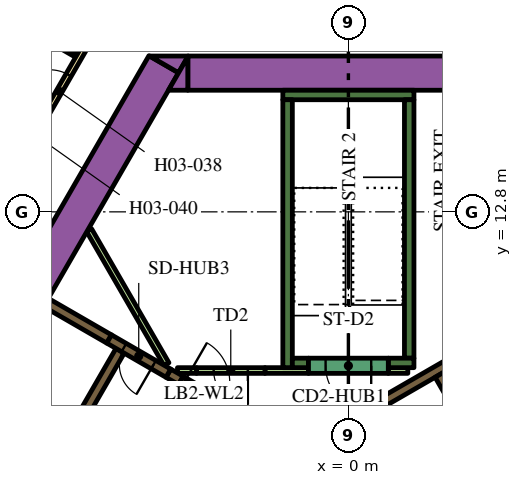
"""IFC4 building model, lengths in metres.
Left out: names, types, materials, properties, quantities, classifications, styles, units other than length and angle.
Written with IfcOpenShell. Run it as: python <this file> out.ifc"""

import sys

from ifc_helpers import new_model, si_unit, direction, frame, frame_2d, origin, place, context, subcontext, project, spatial, polyline, rectangle, outline, extrude, element, fill, save


model = new_model("IFC4")
c1 = context("Model", 3, precision=1e-05, world=origin(), true_north=direction((0.0, 1.0)))
c2 = subcontext(c1, "Body", "Model", "MODEL_VIEW")
j1 = project(units=[si_unit("LENGTHUNIT", "METRE"), si_unit("PLANEANGLEUNIT", "RADIAN")], contexts=[c1])
p1 = place(None, origin())
s1 = spatial("IfcSite", under=j1, at=p1, CompositionType="ELEMENT")
p2 = place(p1, origin())
s2 = spatial("IfcBuilding", under=s1, at=p2, CompositionType="ELEMENT")
p3 = place(p2, frame((0.0, 0.0, 51.0)))
s3 = spatial("IfcBuildingStorey", under=s2, at=p3, CompositionType="ELEMENT", Elevation=51.0)
p4 = place(p3, frame((-15.36, -1.503, 0.0), z_axis=(0.0, 0.0, 1.0), x_axis=(0.50000389221, 0.866023156604, 0.0)))
e1 = element("IfcWall", 1, at=p4, inside=s3, PredefinedType="SOLIDWALL", context=c2, shape_type="SweptSolid", body=[
    extrude(rectangle(XDim=21.0, YDim=0.9, at=frame_2d((10.5, 0.0))), origin(), (0.0, 0.0, 1.0), 3.9),
])
p5 = place(p3, origin())
e2 = element("IfcWall", 2, at=p5, inside=s3, PredefinedType="SOLIDWALL", context=c2, shape_type="SweptSolid", body=[
    extrude(outline(polyline([(-4.215, 16.9), (-4.469, 16.46), (-5.231, 16.9), (-4.215, 16.9)])), origin(), (0.0, 0.0, 1.0), 3.9),
])
p6 = place(p3, frame((-4.224, 16.45, 0.0), z_axis=(0.0, 0.0, 1.0), x_axis=(1.0, 0.0, 0.0)))
e3 = element("IfcWall", 3, at=p6, inside=s3, PredefinedType="SOLIDWALL", context=c2, shape_type="SweptSolid", body=[
    extrude(rectangle(XDim=9.488, YDim=0.9, at=frame_2d((4.744, 0.0))), origin(), (0.0, 0.0, 1.0), 3.9),
])
e4 = element("IfcWall", 4, at=p5, inside=s3, PredefinedType="SOLIDWALL", context=c2, shape_type="SweptSolid", body=[
    extrude(outline(polyline([(-4.734, 16.0), (-4.226, 16.88), (-4.226, 16.0), (-4.734, 16.0)])), origin(), (0.0, 0.0, 1.0), 3.9),
])
p7 = place(p3, frame((-1.725, 15.875, 0.0), z_axis=(0.0, 0.0, 1.0), x_axis=(1.0, 0.0, 0.0)))
e5 = element("IfcWall", 5, at=p7, inside=s3, PredefinedType="SOLIDWALL", context=c2, shape_type="SweptSolid", body=[
    extrude(rectangle(XDim=3.45, YDim=0.25, at=frame_2d((1.725, 0.0))), origin(), (0.0, 0.0, 1.0), 3.9),
])
p8 = place(p3, frame((1.6, 8.95, 0.0), z_axis=(0.0, 0.0, 1.0), x_axis=(0.0, 1.0, 0.0)))
e6 = element("IfcWall", 6, at=p8, inside=s3, PredefinedType="SOLIDWALL", context=c2, shape_type="SweptSolid", body=[
    extrude(rectangle(XDim=6.8, YDim=0.25, at=frame_2d((3.4, 0.0))), origin(), (0.0, 0.0, 1.0), 3.9),
])
p9 = place(p3, frame((1.05, 8.825, 0.0), z_axis=(0.0, 0.0, 1.0), x_axis=(1.0, 0.0, 0.0)))
e7 = element("IfcWall", 7, at=p9, inside=s3, PredefinedType="SOLIDWALL", context=c2, shape_type="SweptSolid", body=[
    extrude(rectangle(XDim=0.675, YDim=0.25, at=frame_2d((0.337, 0.0))), origin(), (0.0, 0.0, 1.0), 3.9),
])
p10 = place(p3, frame((-1.6, 8.7, 0.0), z_axis=(0.0, 0.0, 1.0), x_axis=(0.0, 1.0, 0.0)))
e8 = element("IfcWall", 8, at=p10, inside=s3, PredefinedType="SOLIDWALL", context=c2, shape_type="SweptSolid", body=[
    extrude(rectangle(XDim=7.05, YDim=0.25, at=frame_2d((3.525, 0.0))), origin(), (0.0, 0.0, 1.0), 3.9),
])
p11 = place(p3, frame((-1.475, 8.825, 0.0), z_axis=(0.0, 0.0, 1.0), x_axis=(1.0, 0.0, 0.0)))
e9 = element("IfcWall", 9, at=p11, inside=s3, PredefinedType="SOLIDWALL", context=c2, shape_type="SweptSolid", body=[
    extrude(rectangle(XDim=0.425, YDim=0.25, at=frame_2d((0.212, 0.0))), origin(), (0.0, 0.0, 1.0), 3.9),
])
e10 = element("IfcWall", 10, at=p5, inside=s3, PredefinedType="SOLIDWALL", context=c2, shape_type="SweptSolid", body=[
    extrude(outline(polyline([(2.776, 8.733), (2.499, 8.573), (2.498, 8.573), (2.498, 8.573), (2.282, 8.448), (2.282, 8.448), (0.377, 7.348), (0.16, 7.223), (0.035, 7.439), (3.032, 9.169), (3.03, 9.152), (3.03, 9.133), (3.031, 9.113), (3.035, 9.094), (3.04, 9.075), (3.047, 9.057), (3.056, 9.039), (3.119, 8.931), (2.776, 8.733)])), origin(), (0.0, 0.0, 1.0), 3.9),
])
e11 = element("IfcWall", 11, at=p5, inside=s3, PredefinedType="SOLIDWALL", context=c2, shape_type="SweptSolid", body=[
    extrude(outline(polyline([(-3.128, 7.481), (-3.259, 7.557), (-3.134, 7.773), (-3.003, 7.698), (-3.128, 7.481)])), origin(), (0.0, 0.0, 1.0), 3.9),
])
p12 = place(p3, frame((-7.314, 7.132, 0.0), z_axis=(0.0, 0.0, 1.0), x_axis=(-0.866008176907, 0.50002983664, 0.0)))
e12 = element("IfcWall", 12, at=p12, inside=s3, PredefinedType="SOLIDWALL", context=c2, shape_type="SweptSolid", body=[
    extrude(rectangle(XDim=2.2, YDim=0.25, at=frame_2d((1.1, 0.0))), origin(), (0.0, 0.0, 1.0), 3.9),
])
p13 = place(p3, frame((-6.296, 9.455, 0.0), z_axis=(0.0, 0.0, 1.0), x_axis=(-0.866011930837, 0.500023335103, 0.0)))
e13 = element("IfcWall", 13, at=p13, inside=s3, PredefinedType="SOLIDWALL", context=c2, shape_type="SweptSolid", body=[
    extrude(rectangle(XDim=1.92, YDim=0.25, at=frame_2d((0.96, 0.0))), origin(), (0.0, 0.0, 1.0), 3.9),
])
p14 = place(p3, frame((-4.409, 8.365, 0.0), z_axis=(0.0, 0.0, 1.0), x_axis=(-0.866057014183, 0.499945245186, 0.0)))
e14 = element("IfcWall", 14, at=p14, inside=s3, PredefinedType="SOLIDWALL", context=c2, shape_type="SweptSolid", body=[
    extrude(rectangle(XDim=0.379, YDim=0.25, at=frame_2d((0.19, 0.0))), origin(), (0.0, 0.0, 1.0), 3.9),
])
p15 = place(p3, frame((-2.195, 8.625, 0.0), z_axis=(0.0, 0.0, 1.0), x_axis=(1.0, 0.0, 0.0)))
e15 = element("IfcWall", 15, at=p15, inside=s3, PredefinedType="PARTITIONING", context=c2, shape_type="SweptSolid", body=[
    extrude(rectangle(XDim=1.145, YDim=0.15, at=frame_2d((0.573, 0.0))), origin(), (0.0, 0.0, 1.0), 2.75),
])
p16 = place(p3, frame((-6.823, 12.318, 0.0), z_axis=(0.0, 0.0, 1.0), x_axis=(0.500007885066, -0.866020851292, 0.0)))
e16 = element("IfcWall", 16, at=p16, inside=s3, PredefinedType="PARTITIONING", context=c2, shape_type="SweptSolid", body=[
    extrude(rectangle(XDim=4.072, YDim=0.15, at=frame_2d((2.036, 0.0))), origin(), (0.0, 0.0, 1.0), 2.75),
])
p17 = place(p3, frame((-4.498, 8.625, 0.0), z_axis=(0.0, 0.0, 1.0), x_axis=(1.0, 0.0, 0.0)))
e17 = element("IfcWall", 17, at=p17, inside=s3, PredefinedType="PARTITIONING", context=c2, shape_type="SweptSolid", body=[
    extrude(rectangle(XDim=0.502, YDim=0.15, at=frame_2d((0.251, 0.0))), origin(), (0.0, 0.0, 1.0), 2.75),
])
p18 = place(p3, frame((1.05, 8.625, 0.0), z_axis=(0.0, 0.0, 1.0), x_axis=(1.0, 0.0, 0.0)))
e18 = element("IfcWall", 18, at=p18, inside=s3, PredefinedType="PARTITIONING", context=c2, shape_type="SweptSolid", body=[
    extrude(rectangle(XDim=0.514, YDim=0.15, at=frame_2d((0.257, 0.0))), origin(), (0.0, 0.0, 1.0), 2.75),
])
p19 = place(p3, frame((8.565, -2.185, 0.0), z_axis=(0.0, 0.0, 1.0), x_axis=(-0.499997954832, 0.866026584559, 0.0)))
e19 = element("IfcWall", 19, at=p19, inside=s3, PredefinedType="SOLIDWALL", context=c2, shape_type="SweptSolid", body=[
    extrude(rectangle(XDim=12.35, YDim=0.25, at=frame_2d((6.175, 0.0))), origin(), (0.0, 0.0, 1.0), 3.9),
])
p20 = place(p19, frame((5.725, 0.0, 0.0)))
e20 = element("IfcOpeningElement", 20, at=p20, cuts=e19, PredefinedType="OPENING", context=c2, shape_type="SweptSolid", body=[
    extrude(rectangle(XDim=0.9, YDim=2.1, at=frame_2d((0.45, 1.05))), frame((0.0, 0.135, 0.0), z_axis=(0.0, -1.0, 0.0), x_axis=(1.0, 0.0, 0.0)), (0.0, 0.0, 1.0), 0.27),
])
p21 = place(p3, frame((-6.008, 9.144, 0.0), z_axis=(0.0, 0.0, 1.0), x_axis=(-0.500006956611, -0.866021387346, 0.0)))
e21 = element("IfcWall", 21, at=p21, inside=s3, PredefinedType="SOLIDWALL", context=c2, shape_type="SweptSolid", body=[
    extrude(rectangle(XDim=9.83, YDim=0.25, at=frame_2d((4.915, 0.0))), origin(), (0.0, 0.0, 1.0), 3.9),
])
p22 = place(p21, frame((6.985, 0.0, 0.0)))
e22 = element("IfcOpeningElement", 22, at=p22, cuts=e21, PredefinedType="OPENING", context=c2, shape_type="SweptSolid", body=[
    extrude(rectangle(XDim=0.9, YDim=2.1, at=frame_2d((0.45, 1.05))), frame((0.0, 0.135, 0.0), z_axis=(0.0, -1.0, 0.0), x_axis=(1.0, 0.0, 0.0)), (0.0, 0.0, 1.0), 0.27),
])
p23 = place(p3, frame((1.05, 8.75, 0.0), z_axis=(0.0, 0.0, 1.0), x_axis=(-1.0, 0.0, 0.0)))
e23 = element("IfcWall", 23, at=p23, inside=s3, PredefinedType="SOLIDWALL", context=c2, shape_type="SweptSolid", body=[
    extrude(rectangle(XDim=2.1, YDim=0.4, at=frame_2d((1.05, 0.0))), origin(), (0.0, 0.0, 1.0), 3.9),
])
p24 = place(p23, frame((0.45, 0.0, 0.0)))
e24 = element("IfcOpeningElement", 24, at=p24, cuts=e23, PredefinedType="OPENING", context=c2, shape_type="SweptSolid", body=[
    extrude(rectangle(XDim=1.2, YDim=2.1, at=frame_2d((0.6, 1.05))), frame((0.0, 0.21, 0.0), z_axis=(0.0, -1.0, 0.0), x_axis=(1.0, 0.0, 0.0)), (0.0, 0.0, 1.0), 0.42),
])
p25 = place(p3, frame((-2.195, 8.625, 0.0), z_axis=(0.0, 0.0, 1.0), x_axis=(-1.0, 0.0, 0.0)))
e25 = element("IfcWall", 25, at=p25, inside=s3, PredefinedType="PARTITIONING", context=c2, shape_type="SweptSolid", body=[
    extrude(rectangle(XDim=1.8, YDim=0.15, at=frame_2d((0.9, 0.0))), origin(), (0.0, 0.0, 1.0), 2.75),
])
p26 = place(p25, frame((0.45, 0.0, 0.0)))
e26 = element("IfcOpeningElement", 26, at=p26, cuts=e25, PredefinedType="OPENING", context=c2, shape_type="SweptSolid", body=[
    extrude(rectangle(XDim=0.9, YDim=2.1, at=frame_2d((0.45, 1.05))), frame((0.0, 0.085, 0.0), z_axis=(0.0, -1.0, 0.0), x_axis=(1.0, 0.0, 0.0)), (0.0, 0.0, 1.0), 0.17),
])
p27 = place(p3, frame((-4.409, 8.365, 0.0), z_axis=(0.0, 0.0, 1.0), x_axis=(0.866034573852, -0.49998411664, 0.0)))
e27 = element("IfcWall", 27, at=p27, inside=s3, PredefinedType="SOLIDWALL", context=c2, shape_type="SweptSolid", body=[
    extrude(rectangle(XDim=1.4, YDim=0.25, at=frame_2d((0.7, 0.0))), origin(), (0.0, 0.0, 1.0), 3.9),
])
p28 = place(p27, frame((0.1, 0.0, 0.0)))
e28 = element("IfcOpeningElement", 28, at=p28, cuts=e27, PredefinedType="OPENING", context=c2, shape_type="SweptSolid", body=[
    extrude(rectangle(XDim=1.2, YDim=2.1, at=frame_2d((0.6, 1.05))), frame((0.0, 0.135, 0.0), z_axis=(0.0, -1.0, 0.0), x_axis=(1.0, 0.0, 0.0)), (0.0, 0.0, 1.0), 0.27),
])
p29 = place(p3, frame((-4.737, 8.555, 0.0), z_axis=(0.0, 0.0, 1.0), x_axis=(-0.865989075817, 0.500062916607, 0.0)))
e29 = element("IfcWall", 29, at=p29, inside=s3, PredefinedType="SOLIDWALL", context=c2, shape_type="SweptSolid", body=[
    extrude(rectangle(XDim=1.8, YDim=0.25, at=frame_2d((0.9, 0.0))), origin(), (0.0, 0.0, 1.0), 3.9),
])
p30 = place(p29, frame((0.45, 0.0, 0.0)))
e30 = element("IfcOpeningElement", 30, at=p30, cuts=e29, PredefinedType="OPENING", context=c2, shape_type="SweptSolid", body=[
    extrude(rectangle(XDim=0.9, YDim=2.1, at=frame_2d((0.45, 1.05))), frame((0.0, 0.135, 0.0), z_axis=(0.0, -1.0, 0.0), x_axis=(1.0, 0.0, 0.0)), (0.0, 0.0, 1.0), 0.27),
])
p31 = place(p3, frame((-19.081, -3.9, 0.0), z_axis=(0.0, 0.0, 1.0), x_axis=(0.499998313975, 0.866026377209, 0.0)))
e31 = element("IfcWall", 31, at=p31, inside=s3, PredefinedType="PARTITIONING", context=c2, shape_type="SweptSolid", body=[
    extrude(rectangle(XDim=25.766, YDim=0.15, at=frame_2d((12.883, 0.0))), origin(), (0.0, 0.0, 1.0), 2.75),
])
p32 = place(p31, frame((22.445, 0.0, 0.0)))
e32 = element("IfcOpeningElement", 32, at=p32, cuts=e31, PredefinedType="OPENING", context=c2, shape_type="SweptSolid", body=[
    extrude(rectangle(XDim=1.0, YDim=2.1, at=frame_2d((0.5, 1.05))), frame((0.0, 0.085, 0.0), z_axis=(0.0, -1.0, 0.0), x_axis=(1.0, 0.0, 0.0)), (0.0, 0.0, 1.0), 0.17),
])
p33 = place(p31, frame((21.138, 0.0, 0.0)))
e33 = element("IfcOpeningElement", 33, at=p33, cuts=e31, PredefinedType="OPENING", context=c2, shape_type="SweptSolid", body=[
    extrude(rectangle(XDim=1.0, YDim=2.1, at=frame_2d((0.5, 1.05))), frame((0.0, 0.085, 0.0), z_axis=(0.0, -1.0, 0.0), x_axis=(1.0, 0.0, 0.0)), (0.0, 0.0, 1.0), 0.17),
])
p34 = place(p31, frame((14.066, 0.0, 0.0)))
e34 = element("IfcOpeningElement", 34, at=p34, cuts=e31, PredefinedType="OPENING", context=c2, shape_type="SweptSolid", body=[
    extrude(rectangle(XDim=0.9, YDim=2.1, at=frame_2d((0.45, 1.05))), frame((0.0, 0.085, 0.0), z_axis=(0.0, -1.0, 0.0), x_axis=(1.0, 0.0, 0.0)), (0.0, 0.0, 1.0), 0.17),
])
p35 = place(p31, frame((11.693, 0.0, 0.0)))
e35 = element("IfcOpeningElement", 35, at=p35, cuts=e31, PredefinedType="OPENING", context=c2, shape_type="SweptSolid", body=[
    extrude(rectangle(XDim=1.0, YDim=2.1, at=frame_2d((0.5, 1.05))), frame((0.0, 0.085, 0.0), z_axis=(0.0, -1.0, 0.0), x_axis=(1.0, 0.0, 0.0)), (0.0, 0.0, 1.0), 0.17),
])
p36 = place(p3, frame((-9.405, 18.21, 0.0), z_axis=(0.0, 0.0, 1.0), x_axis=(0.865997922154, -0.500047596559, 0.0)))
e36 = element("IfcWall", 36, at=p36, inside=s3, PredefinedType="PARTITIONING", context=c2, shape_type="SweptSolid", body=[
    extrude(rectangle(XDim=2.6, YDim=0.1, at=frame_2d((1.3, 0.0))), origin(), (0.0, 0.0, 1.0), 2.75),
])
p37 = place(p36, frame((1.1, 0.0, 0.0)))
e37 = element("IfcOpeningElement", 37, at=p37, cuts=e36, PredefinedType="OPENING", context=c2, shape_type="SweptSolid", body=[
    extrude(rectangle(XDim=0.9, YDim=2.1, at=frame_2d((0.45, 1.05))), frame((0.0, 0.06, 0.0), z_axis=(0.0, -1.0, 0.0), x_axis=(1.0, 0.0, 0.0)), (0.0, 0.0, 1.0), 0.12),
])
p38 = place(p24, origin())
e38 = element("IfcDoor", 38, at=p38, inside=s3, OperationType="SINGLE_SWING_LEFT", PredefinedType="DOOR", context=c2, shape_type="SweptSolid", body=[
    extrude(rectangle(XDim=1.2, YDim=2.1, at=frame_2d((0.6, 1.05))), frame((0.0, 0.025, 0.0), z_axis=(0.0, -1.0, 0.0), x_axis=(1.0, 0.0, 0.0)), (0.0, 0.0, 1.0), 0.05),
])
fill(e24, e38)
p39 = place(p26, origin())
e39 = element("IfcDoor", 39, at=p39, inside=s3, OperationType="SINGLE_SWING_LEFT", PredefinedType="DOOR", context=c2, shape_type="SweptSolid", body=[
    extrude(rectangle(XDim=0.9, YDim=2.1, at=frame_2d((0.45, 1.05))), frame((0.0, 0.025, 0.0), z_axis=(0.0, -1.0, 0.0), x_axis=(1.0, 0.0, 0.0)), (0.0, 0.0, 1.0), 0.05),
])
fill(e26, e39)
p40 = place(p28, origin())
e40 = element("IfcDoor", 40, at=p40, inside=s3, OperationType="SINGLE_SWING_LEFT", PredefinedType="DOOR", context=c2, shape_type="SweptSolid", body=[
    extrude(rectangle(XDim=1.2, YDim=2.1, at=frame_2d((0.6, 1.05))), frame((0.0, 0.025, 0.0), z_axis=(0.0, -1.0, 0.0), x_axis=(1.0, 0.0, 0.0)), (0.0, 0.0, 1.0), 0.05),
])
fill(e28, e40)
p41 = place(p30, origin())
e41 = element("IfcDoor", 41, at=p41, inside=s3, OperationType="SINGLE_SWING_LEFT", PredefinedType="DOOR", context=c2, shape_type="SweptSolid", body=[
    extrude(rectangle(XDim=0.9, YDim=2.1, at=frame_2d((0.45, 1.05))), frame((0.0, 0.025, 0.0), z_axis=(0.0, -1.0, 0.0), x_axis=(1.0, 0.0, 0.0)), (0.0, 0.0, 1.0), 0.05),
])
fill(e30, e41)
p42 = place(p32, origin())
e42 = element("IfcDoor", 42, at=p42, inside=s3, OperationType="SINGLE_SWING_LEFT", PredefinedType="DOOR", context=c2, shape_type="SweptSolid", body=[
    extrude(rectangle(XDim=1.0, YDim=2.1, at=frame_2d((0.5, 1.05))), frame((0.0, 0.025, 0.0), z_axis=(0.0, -1.0, 0.0), x_axis=(1.0, 0.0, 0.0)), (0.0, 0.0, 1.0), 0.05),
])
fill(e32, e42)
save(model, sys.argv[1])
